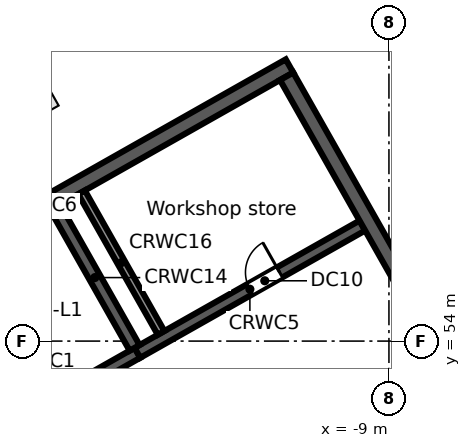
"""IFC4 building model, lengths in metres.
Left out: names, types, materials, properties, quantities, classifications, styles, units other than length and angle.
Written with IfcOpenShell. Run it as: python <this file> out.ifc"""

import sys

from ifc_helpers import new_model, si_unit, direction, frame, frame_2d, origin, origin_2d, place, context, subcontext, project, spatial, rectangle, extrude, element, fill, save


model = new_model("IFC4")
c1 = context("Model", 3, precision=1e-05, world=origin(), true_north=direction((0.0, 1.0)))
c2 = subcontext(c1, "Body", "Model", "MODEL_VIEW")
j1 = project(units=[si_unit("LENGTHUNIT", "METRE"), si_unit("PLANEANGLEUNIT", "RADIAN")], contexts=[c1])
p1 = place(None, origin())
s1 = spatial("IfcSite", under=j1, at=p1, CompositionType="ELEMENT")
p2 = place(p1, origin())
s2 = spatial("IfcBuilding", under=s1, at=p2, CompositionType="ELEMENT")
p3 = place(p2, frame((0.0, 0.0, 304.5)))
s3 = spatial("IfcBuildingStorey", under=s2, at=p3, CompositionType="ELEMENT", Elevation=304.5)
p4 = place(p3, frame((-18.441, 60.406, 0.0), z_axis=(0.0, 0.0, 1.0), x_axis=(-0.87035569594, -0.492423560103, 0.0)))
e1 = element("IfcColumn", 1, at=p4, inside=s3, PredefinedType="COLUMN", context=c2, shape_type="SweptSolid", body=[
    extrude(rectangle(XDim=1.1, YDim=1.1, at=origin_2d()), origin(), (0.0, 0.0, 1.0), 3.8),
])
p5 = place(p3, frame((-58.732, 38.771, 0.0), z_axis=(0.0, 0.0, 1.0), x_axis=(0.870355615581, 0.492423702137, 0.0)))
e2 = element("IfcWall", 2, at=p5, inside=s3, PredefinedType="STANDARD", context=c2, shape_type="SweptSolid", body=[
    extrude(rectangle(XDim=64.052, YDim=0.25, at=frame_2d((32.026, 0.0))), origin(), (0.0, 0.0, 1.0), 3.52),
])
p6 = place(p5, frame((61.259, 0.0, 0.8)))
e3 = element("IfcOpeningElement", 3, at=p6, cuts=e2, PredefinedType="OPENING", context=c2, shape_type="SweptSolid", body=[
    extrude(rectangle(XDim=2.4, YDim=2.2, at=frame_2d((1.2, 1.1))), frame((0.0, 0.135, 0.0), z_axis=(0.0, -1.0, 0.0), x_axis=(1.0, 0.0, 0.0)), (0.0, 0.0, 1.0), 0.27),
])
p7 = place(p5, frame((58.216, 0.0, 0.8)))
e4 = element("IfcOpeningElement", 4, at=p7, cuts=e2, PredefinedType="OPENING", context=c2, shape_type="SweptSolid", body=[
    extrude(rectangle(XDim=2.4, YDim=2.2, at=frame_2d((1.2, 1.1))), frame((0.0, 0.135, 0.0), z_axis=(0.0, -1.0, 0.0), x_axis=(1.0, 0.0, 0.0)), (0.0, 0.0, 1.0), 0.27),
])
p8 = place(p5, frame((55.173, 0.0, 0.8)))
e5 = element("IfcOpeningElement", 5, at=p8, cuts=e2, PredefinedType="OPENING", context=c2, shape_type="SweptSolid", body=[
    extrude(rectangle(XDim=2.4, YDim=2.2, at=frame_2d((1.2, 1.1))), frame((0.0, 0.135, 0.0), z_axis=(0.0, -1.0, 0.0), x_axis=(1.0, 0.0, 0.0)), (0.0, 0.0, 1.0), 0.27),
])
p9 = place(p5, frame((52.129, 0.0, 0.8)))
e6 = element("IfcOpeningElement", 6, at=p9, cuts=e2, PredefinedType="OPENING", context=c2, shape_type="SweptSolid", body=[
    extrude(rectangle(XDim=2.4, YDim=2.2, at=frame_2d((1.2, 1.1))), frame((0.0, 0.135, 0.0), z_axis=(0.0, -1.0, 0.0), x_axis=(1.0, 0.0, 0.0)), (0.0, 0.0, 1.0), 0.27),
])
p10 = place(p5, frame((49.086, 0.0, 0.8)))
e7 = element("IfcOpeningElement", 7, at=p10, cuts=e2, PredefinedType="OPENING", context=c2, shape_type="SweptSolid", body=[
    extrude(rectangle(XDim=2.4, YDim=2.2, at=frame_2d((1.2, 1.1))), frame((0.0, 0.135, 0.0), z_axis=(0.0, -1.0, 0.0), x_axis=(1.0, 0.0, 0.0)), (0.0, 0.0, 1.0), 0.27),
])
p11 = place(p5, frame((46.043, 0.0, 0.8)))
e8 = element("IfcOpeningElement", 8, at=p11, cuts=e2, PredefinedType="OPENING", context=c2, shape_type="SweptSolid", body=[
    extrude(rectangle(XDim=2.4, YDim=2.2, at=frame_2d((1.2, 1.1))), frame((0.0, 0.135, 0.0), z_axis=(0.0, -1.0, 0.0), x_axis=(1.0, 0.0, 0.0)), (0.0, 0.0, 1.0), 0.27),
])
p12 = place(p5, frame((43.0, 0.0, 0.8)))
e9 = element("IfcOpeningElement", 9, at=p12, cuts=e2, PredefinedType="OPENING", context=c2, shape_type="SweptSolid", body=[
    extrude(rectangle(XDim=2.4, YDim=2.2, at=frame_2d((1.2, 1.1))), frame((0.0, 0.135, 0.0), z_axis=(0.0, -1.0, 0.0), x_axis=(1.0, 0.0, 0.0)), (0.0, 0.0, 1.0), 0.27),
])
p13 = place(p5, frame((39.956, 0.0, 0.8)))
e10 = element("IfcOpeningElement", 10, at=p13, cuts=e2, PredefinedType="OPENING", context=c2, shape_type="SweptSolid", body=[
    extrude(rectangle(XDim=2.4, YDim=2.2, at=frame_2d((1.2, 1.1))), frame((0.0, 0.135, 0.0), z_axis=(0.0, -1.0, 0.0), x_axis=(1.0, 0.0, 0.0)), (0.0, 0.0, 1.0), 0.27),
])
p14 = place(p5, frame((36.913, 0.0, 0.8)))
e11 = element("IfcOpeningElement", 11, at=p14, cuts=e2, PredefinedType="OPENING", context=c2, shape_type="SweptSolid", body=[
    extrude(rectangle(XDim=2.4, YDim=2.2, at=frame_2d((1.2, 1.1))), frame((0.0, 0.135, 0.0), z_axis=(0.0, -1.0, 0.0), x_axis=(1.0, 0.0, 0.0)), (0.0, 0.0, 1.0), 0.27),
])
p15 = place(p5, frame((33.87, 0.0, 0.8)))
e12 = element("IfcOpeningElement", 12, at=p15, cuts=e2, PredefinedType="OPENING", context=c2, shape_type="SweptSolid", body=[
    extrude(rectangle(XDim=2.4, YDim=2.2, at=frame_2d((1.2, 1.1))), frame((0.0, 0.135, 0.0), z_axis=(0.0, -1.0, 0.0), x_axis=(1.0, 0.0, 0.0)), (0.0, 0.0, 1.0), 0.27),
])
p16 = place(p5, frame((30.826, 0.0, 0.8)))
e13 = element("IfcOpeningElement", 13, at=p16, cuts=e2, PredefinedType="OPENING", context=c2, shape_type="SweptSolid", body=[
    extrude(rectangle(XDim=2.4, YDim=2.2, at=frame_2d((1.2, 1.1))), frame((0.0, 0.135, 0.0), z_axis=(0.0, -1.0, 0.0), x_axis=(1.0, 0.0, 0.0)), (0.0, 0.0, 1.0), 0.27),
])
p17 = place(p5, frame((27.783, 0.0, 0.8)))
e14 = element("IfcOpeningElement", 14, at=p17, cuts=e2, PredefinedType="OPENING", context=c2, shape_type="SweptSolid", body=[
    extrude(rectangle(XDim=2.4, YDim=2.2, at=frame_2d((1.2, 1.1))), frame((0.0, 0.135, 0.0), z_axis=(0.0, -1.0, 0.0), x_axis=(1.0, 0.0, 0.0)), (0.0, 0.0, 1.0), 0.27),
])
p18 = place(p5, frame((24.74, 0.0, 0.8)))
e15 = element("IfcOpeningElement", 15, at=p18, cuts=e2, PredefinedType="OPENING", context=c2, shape_type="SweptSolid", body=[
    extrude(rectangle(XDim=2.4, YDim=2.2, at=frame_2d((1.2, 1.1))), frame((0.0, 0.135, 0.0), z_axis=(0.0, -1.0, 0.0), x_axis=(1.0, 0.0, 0.0)), (0.0, 0.0, 1.0), 0.27),
])
p19 = place(p5, frame((21.696, 0.0, 0.8)))
e16 = element("IfcOpeningElement", 16, at=p19, cuts=e2, PredefinedType="OPENING", context=c2, shape_type="SweptSolid", body=[
    extrude(rectangle(XDim=2.4, YDim=2.2, at=frame_2d((1.2, 1.1))), frame((0.0, 0.135, 0.0), z_axis=(0.0, -1.0, 0.0), x_axis=(1.0, 0.0, 0.0)), (0.0, 0.0, 1.0), 0.27),
])
p20 = place(p5, frame((18.653, 0.0, 0.8)))
e17 = element("IfcOpeningElement", 17, at=p20, cuts=e2, PredefinedType="OPENING", context=c2, shape_type="SweptSolid", body=[
    extrude(rectangle(XDim=2.4, YDim=2.2, at=frame_2d((1.2, 1.1))), frame((0.0, 0.135, 0.0), z_axis=(0.0, -1.0, 0.0), x_axis=(1.0, 0.0, 0.0)), (0.0, 0.0, 1.0), 0.27),
])
p21 = place(p5, frame((15.61, 0.0, 0.8)))
e18 = element("IfcOpeningElement", 18, at=p21, cuts=e2, PredefinedType="OPENING", context=c2, shape_type="SweptSolid", body=[
    extrude(rectangle(XDim=2.4, YDim=2.2, at=frame_2d((1.2, 1.1))), frame((0.0, 0.135, 0.0), z_axis=(0.0, -1.0, 0.0), x_axis=(1.0, 0.0, 0.0)), (0.0, 0.0, 1.0), 0.27),
])
p22 = place(p5, frame((12.567, 0.0, 0.8)))
e19 = element("IfcOpeningElement", 19, at=p22, cuts=e2, PredefinedType="OPENING", context=c2, shape_type="SweptSolid", body=[
    extrude(rectangle(XDim=2.4, YDim=2.2, at=frame_2d((1.2, 1.1))), frame((0.0, 0.135, 0.0), z_axis=(0.0, -1.0, 0.0), x_axis=(1.0, 0.0, 0.0)), (0.0, 0.0, 1.0), 0.27),
])
p23 = place(p5, frame((9.523, 0.0, 0.8)))
e20 = element("IfcOpeningElement", 20, at=p23, cuts=e2, PredefinedType="OPENING", context=c2, shape_type="SweptSolid", body=[
    extrude(rectangle(XDim=2.4, YDim=2.2, at=frame_2d((1.2, 1.1))), frame((0.0, 0.135, 0.0), z_axis=(0.0, -1.0, 0.0), x_axis=(1.0, 0.0, 0.0)), (0.0, 0.0, 1.0), 0.27),
])
p24 = place(p5, frame((6.48, 0.0, 0.8)))
e21 = element("IfcOpeningElement", 21, at=p24, cuts=e2, PredefinedType="OPENING", context=c2, shape_type="SweptSolid", body=[
    extrude(rectangle(XDim=2.4, YDim=2.2, at=frame_2d((1.2, 1.1))), frame((0.0, 0.135, 0.0), z_axis=(0.0, -1.0, 0.0), x_axis=(1.0, 0.0, 0.0)), (0.0, 0.0, 1.0), 0.27),
])
p25 = place(p5, frame((3.437, 0.0, 0.8)))
e22 = element("IfcOpeningElement", 22, at=p25, cuts=e2, PredefinedType="OPENING", context=c2, shape_type="SweptSolid", body=[
    extrude(rectangle(XDim=2.4, YDim=2.2, at=frame_2d((1.2, 1.1))), frame((0.0, 0.135, 0.0), z_axis=(0.0, -1.0, 0.0), x_axis=(1.0, 0.0, 0.0)), (0.0, 0.0, 1.0), 0.27),
])
p26 = place(p5, frame((0.393, 0.0, 0.8)))
e23 = element("IfcOpeningElement", 23, at=p26, cuts=e2, PredefinedType="OPENING", context=c2, shape_type="SweptSolid", body=[
    extrude(rectangle(XDim=2.4, YDim=2.2, at=frame_2d((1.2, 1.1))), frame((0.0, 0.135, 0.0), z_axis=(0.0, -1.0, 0.0), x_axis=(1.0, 0.0, 0.0)), (0.0, 0.0, 1.0), 0.27),
])
p27 = place(p3, frame((-13.365, 49.911, 0.0), z_axis=(0.0, 0.0, 1.0), x_axis=(0.870347618718, 0.492437836272, 0.0)))
e24 = element("IfcWall", 24, at=p27, inside=s3, PredefinedType="SOLIDWALL", context=c2, shape_type="SweptSolid", body=[
    extrude(rectangle(XDim=6.7, YDim=0.3, at=frame_2d((3.35, 0.0))), origin(), (0.0, 0.0, 1.0), 3.52),
])
p28 = place(p27, frame((2.95, 0.0, 0.0)))
e25 = element("IfcOpeningElement", 25, at=p28, cuts=e24, PredefinedType="OPENING", context=c2, shape_type="SweptSolid", body=[
    extrude(rectangle(XDim=0.9, YDim=2.1, at=frame_2d((0.45, 1.05))), frame((0.0, 0.16, 0.0), z_axis=(0.0, -1.0, 0.0), x_axis=(1.0, 0.0, 0.0)), (0.0, 0.0, 1.0), 0.32),
])
p29 = place(p3, frame((-22.059, 50.047, 0.0), z_axis=(0.0, 0.0, 1.0), x_axis=(0.87035077051, 0.49243226567, 0.0)))
e26 = element("IfcWall", 26, at=p29, inside=s3, PredefinedType="SOLIDWALL", context=c2, shape_type="SweptSolid", body=[
    extrude(rectangle(XDim=7.4, YDim=0.3, at=frame_2d((3.7, 0.0))), origin(), (0.0, 0.0, 1.0), 3.52),
])
p30 = place(p29, frame((0.4, 0.0, 0.0)))
e27 = element("IfcOpeningElement", 27, at=p30, cuts=e26, PredefinedType="OPENING", context=c2, shape_type="SweptSolid", body=[
    extrude(rectangle(XDim=1.0, YDim=2.1, at=frame_2d((0.5, 1.05))), frame((0.0, 0.16, 0.0), z_axis=(0.0, -1.0, 0.0), x_axis=(1.0, 0.0, 0.0)), (0.0, 0.0, 1.0), 0.32),
])
p31 = place(p3, frame((-15.618, 53.691, 0.0), z_axis=(0.0, 0.0, 1.0), x_axis=(0.870362830851, 0.492410948978, 0.0)))
e28 = element("IfcWall", 28, at=p31, inside=s3, PredefinedType="SOLIDWALL", context=c2, shape_type="SweptSolid", body=[
    extrude(rectangle(XDim=6.8, YDim=0.3, at=frame_2d((3.4, 0.0))), origin(), (0.0, 0.0, 1.0), 3.52),
])
p32 = place(p31, frame((3.4, 0.0, 0.0)))
e29 = element("IfcOpeningElement", 29, at=p32, cuts=e28, PredefinedType="OPENING", context=c2, shape_type="SweptSolid", body=[
    extrude(rectangle(XDim=0.9, YDim=2.1, at=frame_2d((0.45, 1.05))), frame((0.0, 0.16, 0.0), z_axis=(0.0, -1.0, 0.0), x_axis=(1.0, 0.0, 0.0)), (0.0, 0.0, 1.0), 0.32),
])
p33 = place(p3, frame((-24.672, 53.854, 0.0), z_axis=(0.0, 0.0, 1.0), x_axis=(0.870353598469, 0.492427267353, 0.0)))
e30 = element("IfcWall", 30, at=p33, inside=s3, PredefinedType="SOLIDWALL", context=c2, shape_type="SweptSolid", body=[
    extrude(rectangle(XDim=15.0, YDim=0.4, at=frame_2d((7.5, 0.0))), origin(), (0.0, 0.0, 1.0), 3.52),
])
p34 = place(p3, frame((-24.4, 53.779, 0.0), z_axis=(0.0, 0.0, 1.0), x_axis=(0.492421663121, -0.870356769198, 0.0)))
e31 = element("IfcWall", 31, at=p34, inside=s3, PredefinedType="SOLIDWALL", context=c2, shape_type="SweptSolid", body=[
    extrude(rectangle(XDim=13.2, YDim=0.4, at=frame_2d((6.6, 0.0))), origin(), (0.0, 0.0, 1.0), 3.52),
])
p35 = place(p3, frame((-17.785, 57.521, 0.0), z_axis=(0.0, 0.0, 1.0), x_axis=(0.492422543467, -0.870356271124, 0.0)))
e32 = element("IfcWall", 32, at=p35, inside=s3, PredefinedType="SOLIDWALL", context=c2, shape_type="SweptSolid", body=[
    extrude(rectangle(XDim=4.25, YDim=0.3, at=frame_2d((2.125, 0.0))), origin(), (0.0, 0.0, 1.0), 3.52),
])
p36 = place(p3, frame((-17.089, 57.915, 0.0), z_axis=(0.0, 0.0, 1.0), x_axis=(0.492422543467, -0.870356271124, 0.0)))
e33 = element("IfcWall", 33, at=p36, inside=s3, PredefinedType="SOLIDWALL", context=c2, shape_type="SweptSolid", body=[
    extrude(rectangle(XDim=4.25, YDim=0.2, at=frame_2d((2.125, 0.0))), origin(), (0.0, 0.0, 1.0), 3.52),
])
p37 = place(p3, frame((-11.692, 60.968, 0.0), z_axis=(0.0, 0.0, 1.0), x_axis=(0.492421663121, -0.870356769198, 0.0)))
e34 = element("IfcWall", 34, at=p37, inside=s3, PredefinedType="SOLIDWALL", context=c2, shape_type="SweptSolid", body=[
    extrude(rectangle(XDim=13.2, YDim=0.4, at=frame_2d((6.6, 0.0))), origin(), (0.0, 0.0, 1.0), 3.52),
])
p38 = place(p11, origin())
e35 = element("IfcWindow", 35, at=p38, inside=s3, PartitioningType="SINGLE_PANEL", PredefinedType="WINDOW", context=c2, shape_type="SweptSolid", body=[
    extrude(rectangle(XDim=2.4, YDim=2.2, at=frame_2d((1.2, 1.1))), frame((0.0, 0.03, 0.0), z_axis=(0.0, -1.0, 0.0), x_axis=(1.0, 0.0, 0.0)), (0.0, 0.0, 1.0), 0.06),
])
fill(e8, e35)
p39 = place(p32, origin())
e36 = element("IfcDoor", 36, at=p39, inside=s3, OperationType="SINGLE_SWING_RIGHT", PredefinedType="DOOR", context=c2, shape_type="SweptSolid", body=[
    extrude(rectangle(XDim=0.9, YDim=2.1, at=frame_2d((0.45, 1.05))), frame((0.0, 0.025, 0.0), z_axis=(0.0, -1.0, 0.0), x_axis=(1.0, 0.0, 0.0)), (0.0, 0.0, 1.0), 0.05),
])
fill(e29, e36)
save(model, sys.argv[1])
